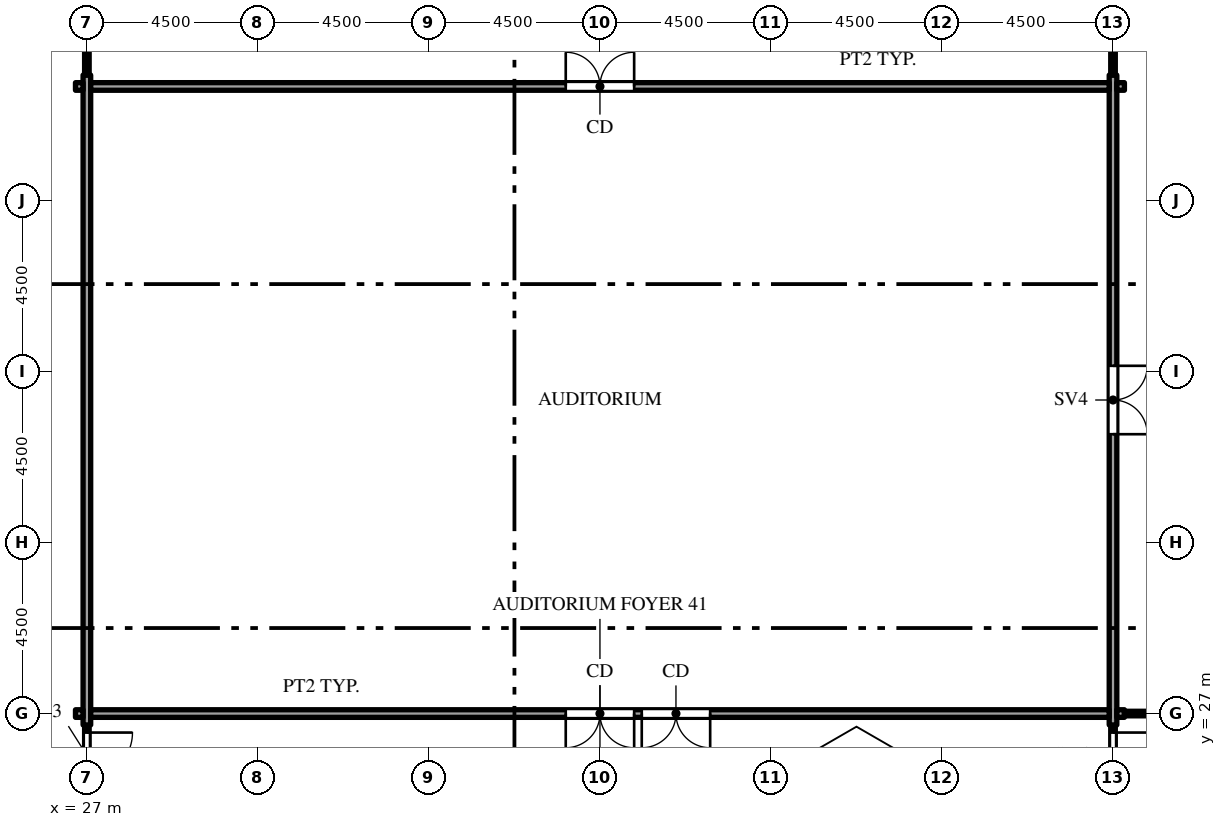
"""IFC4 building model, lengths in metres.
Left out: names, types, materials, properties, quantities, classifications, styles, units other than length and angle.
Written with IfcOpenShell. Run it as: python <this file> out.ifc"""

import sys

from ifc_helpers import new_model, si_unit, direction, frame, frame_2d, origin, place, context, subcontext, project, spatial, rectangle, extrude, element, fill, save


model = new_model("IFC4")
c1 = context("Model", 3, precision=1e-05, world=origin(), true_north=direction((0.0, 1.0)))
c2 = subcontext(c1, "Body", "Model", "MODEL_VIEW")
j1 = project(units=[si_unit("LENGTHUNIT", "METRE"), si_unit("PLANEANGLEUNIT", "RADIAN")], contexts=[c1])
p1 = place(None, origin())
s1 = spatial("IfcSite", under=j1, at=p1, CompositionType="ELEMENT")
p2 = place(p1, origin())
s2 = spatial("IfcBuilding", under=s1, at=p2, CompositionType="ELEMENT")
p3 = place(p2, origin())
s3 = spatial("IfcBuildingStorey", under=s2, at=p3, CompositionType="ELEMENT", Elevation=0.0)
p4 = place(p3, frame((27.0, 22.2, 0.0), z_axis=(0.0, 0.0, 1.0), x_axis=(0.0, 1.0, 0.0)))
e1 = element("IfcWall", 1, at=p4, inside=s3, PredefinedType="PARTITIONING", context=c2, shape_type="SweptSolid", body=[
    extrude(rectangle(XDim=4.5, YDim=0.12, at=frame_2d((2.25, 0.0))), origin(), (0.0, 0.0, 1.0), 6.5),
])
p5 = place(p4, frame((3.1, 0.0, 0.0)))
e2 = element("IfcOpeningElement", 2, at=p5, cuts=e1, PredefinedType="OPENING", context=c2, shape_type="SweptSolid", body=[
    extrude(rectangle(XDim=1.2, YDim=2.1, at=frame_2d((0.6, 1.05))), frame((0.0, 0.07, 0.0), z_axis=(0.0, -1.0, 0.0), x_axis=(1.0, 0.0, 0.0)), (0.0, 0.0, 1.0), 0.14),
])
p6 = place(p3, frame((27.0, 26.7, 0.0), z_axis=(0.0, 0.0, 1.0), x_axis=(0.0, 1.0, 0.0)))
e3 = element("IfcWall", 3, at=p6, inside=s3, PredefinedType="PARTITIONING", context=c2, shape_type="SweptSolid", body=[
    extrude(rectangle(XDim=17.1, YDim=0.2, at=frame_2d((8.55, 0.0))), origin(), (0.0, 0.0, 1.0), 6.66),
])
p7 = place(p3, frame((27.0, 43.8, 0.0), z_axis=(0.0, 0.0, 1.0), x_axis=(0.0, 1.0, 0.0)))
e4 = element("IfcWall", 4, at=p7, inside=s3, PredefinedType="PARTITIONING", context=c2, shape_type="SweptSolid", body=[
    extrude(rectangle(XDim=5.55, YDim=0.12, at=frame_2d((2.775, 0.0))), origin(), (0.0, 0.0, 1.0), 6.66),
])
p8 = place(p7, frame((2.065, 0.0, 0.0)))
e5 = element("IfcOpeningElement", 5, at=p8, cuts=e4, PredefinedType="OPENING", context=c2, shape_type="SweptSolid", body=[
    extrude(rectangle(XDim=1.2, YDim=2.1, at=frame_2d((0.6, 1.05))), frame((0.0, 0.07, 0.0), z_axis=(0.0, -1.0, 0.0), x_axis=(1.0, 0.0, 0.0)), (0.0, 0.0, 1.0), 0.14),
])
p9 = place(p3, frame((54.0, 22.4, 0.0), z_axis=(0.0, 0.0, 1.0), x_axis=(0.0, 1.0, 0.0)))
e6 = element("IfcWall", 6, at=p9, inside=s3, PredefinedType="PARTITIONING", context=c2, shape_type="SweptSolid", body=[
    extrude(rectangle(XDim=4.3, YDim=0.12, at=frame_2d((2.15, 0.0))), origin(), (0.0, 0.0, 1.0), 6.66),
])
p10 = place(p9, frame((2.9, 0.0, 0.0)))
e7 = element("IfcOpeningElement", 7, at=p10, cuts=e6, PredefinedType="OPENING", context=c2, shape_type="SweptSolid", body=[
    extrude(rectangle(XDim=1.2, YDim=2.1, at=frame_2d((0.6, 1.05))), frame((0.0, 0.07, 0.0), z_axis=(0.0, -1.0, 0.0), x_axis=(1.0, 0.0, 0.0)), (0.0, 0.0, 1.0), 0.14),
])
p11 = place(p3, frame((54.0, 26.7, 0.0), z_axis=(0.0, 0.0, 1.0), x_axis=(0.0, 1.0, 0.0)))
e8 = element("IfcWall", 8, at=p11, inside=s3, PredefinedType="PARTITIONING", context=c2, shape_type="SweptSolid", body=[
    extrude(rectangle(XDim=17.1, YDim=0.2, at=frame_2d((8.55, 0.0))), origin(), (0.0, 0.0, 1.0), 6.66),
])
p12 = place(p11, frame((7.65, 0.0, 0.0)))
e9 = element("IfcOpeningElement", 9, at=p12, cuts=e8, PredefinedType="OPENING", context=c2, shape_type="SweptSolid", body=[
    extrude(rectangle(XDim=1.8, YDim=2.1, at=frame_2d((0.9, 1.05))), frame((0.0, 0.11, 0.0), z_axis=(0.0, -1.0, 0.0), x_axis=(1.0, 0.0, 0.0)), (0.0, 0.0, 1.0), 0.22),
])
p13 = place(p3, frame((54.0, 43.8, 0.0), z_axis=(0.0, 0.0, 1.0), x_axis=(0.0, 1.0, 0.0)))
e10 = element("IfcWall", 10, at=p13, inside=s3, PredefinedType="PARTITIONING", context=c2, shape_type="SweptSolid", body=[
    extrude(rectangle(XDim=5.55, YDim=0.12, at=frame_2d((2.775, 0.0))), origin(), (0.0, 0.0, 1.0), 6.66),
])
p14 = place(p3, frame((26.7, 27.0, 0.0), z_axis=(0.0, 0.0, 1.0), x_axis=(1.0, 0.0, 0.0)))
e11 = element("IfcWall", 11, at=p14, inside=s3, PredefinedType="PARTITIONING", context=c2, shape_type="SweptSolid", body=[
    extrude(rectangle(XDim=0.2, YDim=0.2, at=frame_2d((0.1, 0.0))), origin(), (0.0, 0.0, 1.0), 6.66),
])
p15 = place(p3, frame((27.1, 27.0, 0.0), z_axis=(0.0, 0.0, 1.0), x_axis=(1.0, 0.0, 0.0)))
e12 = element("IfcWall", 12, at=p15, inside=s3, PredefinedType="PARTITIONING", context=c2, shape_type="SweptSolid", body=[
    extrude(rectangle(XDim=26.8, YDim=0.2, at=frame_2d((13.4, 0.0))), origin(), (0.0, 0.0, 1.0), 6.66),
])
p16 = place(p15, frame((12.5, 0.0, 0.0)))
e13 = element("IfcOpeningElement", 13, at=p16, cuts=e12, PredefinedType="OPENING", context=c2, shape_type="SweptSolid", body=[
    extrude(rectangle(XDim=1.8, YDim=2.1, at=frame_2d((0.9, 1.05))), frame((0.0, 0.11, 0.0), z_axis=(0.0, -1.0, 0.0), x_axis=(1.0, 0.0, 0.0)), (0.0, 0.0, 1.0), 0.22),
])
p17 = place(p15, frame((14.5, 0.0, 0.0)))
e14 = element("IfcOpeningElement", 14, at=p17, cuts=e12, PredefinedType="OPENING", context=c2, shape_type="SweptSolid", body=[
    extrude(rectangle(XDim=1.8, YDim=2.1, at=frame_2d((0.9, 1.05))), frame((0.0, 0.11, 0.0), z_axis=(0.0, -1.0, 0.0), x_axis=(1.0, 0.0, 0.0)), (0.0, 0.0, 1.0), 0.22),
])
p18 = place(p3, frame((54.1, 27.0, 0.0), z_axis=(0.0, 0.0, 1.0), x_axis=(1.0, 0.0, 0.0)))
e15 = element("IfcWall", 15, at=p18, inside=s3, PredefinedType="PARTITIONING", context=c2, shape_type="SweptSolid", body=[
    extrude(rectangle(XDim=0.2, YDim=0.2, at=frame_2d((0.1, 0.0))), origin(), (0.0, 0.0, 1.0), 6.66),
])
p19 = place(p3, frame((54.3, 27.0, 0.0), z_axis=(0.0, 0.0, 1.0), x_axis=(1.0, 0.0, 0.0)))
e16 = element("IfcWall", 16, at=p19, inside=s3, PredefinedType="PARTITIONING", context=c2, shape_type="SweptSolid", body=[
    extrude(rectangle(XDim=13.05, YDim=0.12, at=frame_2d((6.525, 0.0))), origin(), (0.0, 0.0, 1.0), 6.66),
])
p20 = place(p19, frame((5.795, 0.0, 0.0)))
e17 = element("IfcOpeningElement", 17, at=p20, cuts=e16, PredefinedType="OPENING", context=c2, shape_type="SweptSolid", body=[
    extrude(rectangle(XDim=1.2, YDim=2.1, at=frame_2d((0.6, 1.05))), frame((0.0, 0.07, 0.0), z_axis=(0.0, -1.0, 0.0), x_axis=(1.0, 0.0, 0.0)), (0.0, 0.0, 1.0), 0.14),
])
p21 = place(p3, frame((26.7, 43.5, 0.0), z_axis=(0.0, 0.0, 1.0), x_axis=(1.0, 0.0, 0.0)))
e18 = element("IfcWall", 18, at=p21, inside=s3, PredefinedType="PARTITIONING", context=c2, shape_type="SweptSolid", body=[
    extrude(rectangle(XDim=0.2, YDim=0.2, at=frame_2d((0.1, 0.0))), origin(), (0.0, 0.0, 1.0), 6.66),
])
p22 = place(p3, frame((27.1, 43.5, 0.0), z_axis=(0.0, 0.0, 1.0), x_axis=(1.0, 0.0, 0.0)))
e19 = element("IfcWall", 19, at=p22, inside=s3, PredefinedType="PARTITIONING", context=c2, shape_type="SweptSolid", body=[
    extrude(rectangle(XDim=26.8, YDim=0.2, at=frame_2d((13.4, 0.0))), origin(), (0.0, 0.0, 1.0), 6.66),
])
p23 = place(p22, frame((12.5, 0.0, 0.0)))
e20 = element("IfcOpeningElement", 20, at=p23, cuts=e19, PredefinedType="OPENING", context=c2, shape_type="SweptSolid", body=[
    extrude(rectangle(XDim=1.8, YDim=2.1, at=frame_2d((0.9, 1.05))), frame((0.0, 0.11, 0.0), z_axis=(0.0, -1.0, 0.0), x_axis=(1.0, 0.0, 0.0)), (0.0, 0.0, 1.0), 0.22),
])
p24 = place(p3, frame((54.1, 43.5, 0.0), z_axis=(0.0, 0.0, 1.0), x_axis=(1.0, 0.0, 0.0)))
e21 = element("IfcWall", 21, at=p24, inside=s3, PredefinedType="PARTITIONING", context=c2, shape_type="SweptSolid", body=[
    extrude(rectangle(XDim=0.2, YDim=0.2, at=frame_2d((0.1, 0.0))), origin(), (0.0, 0.0, 1.0), 6.66),
])
p25 = place(p5, origin())
e22 = element("IfcDoor", 22, at=p25, inside=s3, OperationType="SINGLE_SWING_RIGHT", PredefinedType="DOOR", context=c2, shape_type="SweptSolid", body=[
    extrude(rectangle(XDim=1.2, YDim=2.1, at=frame_2d((0.6, 1.05))), frame((0.0, 0.025, 0.0), z_axis=(0.0, -1.0, 0.0), x_axis=(1.0, 0.0, 0.0)), (0.0, 0.0, 1.0), 0.05),
])
fill(e2, e22)
p26 = place(p16, origin())
e23 = element("IfcDoor", 23, at=p26, inside=s3, OperationType="DOUBLE_DOOR_SINGLE_SWING", PredefinedType="DOOR", context=c2, shape_type="SweptSolid", body=[
    extrude(rectangle(XDim=1.8, YDim=2.1, at=frame_2d((0.9, 1.05))), frame((0.0, 0.025, 0.0), z_axis=(0.0, -1.0, 0.0), x_axis=(1.0, 0.0, 0.0)), (0.0, 0.0, 1.0), 0.05),
])
fill(e13, e23)
p27 = place(p17, origin())
e24 = element("IfcDoor", 24, at=p27, inside=s3, OperationType="DOUBLE_DOOR_SINGLE_SWING", PredefinedType="DOOR", context=c2, shape_type="SweptSolid", body=[
    extrude(rectangle(XDim=1.8, YDim=2.1, at=frame_2d((0.9, 1.05))), frame((0.0, 0.025, 0.0), z_axis=(0.0, -1.0, 0.0), x_axis=(1.0, 0.0, 0.0)), (0.0, 0.0, 1.0), 0.05),
])
fill(e14, e24)
p28 = place(p23, origin())
e25 = element("IfcDoor", 25, at=p28, inside=s3, OperationType="DOUBLE_DOOR_SINGLE_SWING", PredefinedType="DOOR", context=c2, shape_type="SweptSolid", body=[
    extrude(rectangle(XDim=1.8, YDim=2.1, at=frame_2d((0.9, 1.05))), frame((0.0, 0.025, 0.0), z_axis=(0.0, -1.0, 0.0), x_axis=(1.0, 0.0, 0.0)), (0.0, 0.0, 1.0), 0.05),
])
fill(e20, e25)
p29 = place(p12, origin())
e26 = element("IfcDoor", 26, at=p29, inside=s3, OperationType="DOUBLE_DOOR_SINGLE_SWING", PredefinedType="DOOR", context=c2, shape_type="SweptSolid", body=[
    extrude(rectangle(XDim=1.8, YDim=2.1, at=frame_2d((0.9, 1.05))), frame((0.0, 0.025, 0.0), z_axis=(0.0, -1.0, 0.0), x_axis=(1.0, 0.0, 0.0)), (0.0, 0.0, 1.0), 0.05),
])
fill(e9, e26)
p30 = place(p10, origin())
e27 = element("IfcDoor", 27, at=p30, inside=s3, OperationType="SINGLE_SWING_RIGHT", PredefinedType="DOOR", context=c2, shape_type="SweptSolid", body=[
    extrude(rectangle(XDim=1.2, YDim=2.1, at=frame_2d((0.6, 1.05))), frame((0.0, 0.025, 0.0), z_axis=(0.0, -1.0, 0.0), x_axis=(1.0, 0.0, 0.0)), (0.0, 0.0, 1.0), 0.05),
])
fill(e7, e27)
save(model, sys.argv[1])
